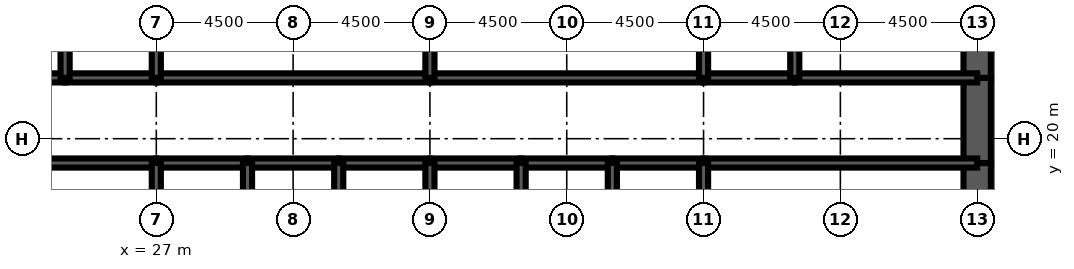
"""IFC4 building model, lengths in metres.
Left out: names, types, materials, properties, quantities, classifications, styles, units other than length and angle.
Written with IfcOpenShell. Run it as: python <this file> out.ifc"""

import sys

from ifc_helpers import new_model, si_unit, direction, frame, frame_2d, origin, place, context, subcontext, project, spatial, rectangle, extrude, element, fill, save


model = new_model("IFC4")
c1 = context("Model", 3, precision=1e-05, world=origin(), true_north=direction((0.0, 1.0)))
c2 = subcontext(c1, "Body", "Model", "MODEL_VIEW")
j1 = project(units=[si_unit("LENGTHUNIT", "METRE"), si_unit("PLANEANGLEUNIT", "RADIAN")], contexts=[c1])
p1 = place(None, origin())
s1 = spatial("IfcSite", under=j1, at=p1, CompositionType="ELEMENT")
p2 = place(p1, origin())
s2 = spatial("IfcBuilding", under=s1, at=p2, CompositionType="ELEMENT")
p3 = place(p2, frame((0.0, 0.0, 90.5)))
s3 = spatial("IfcBuildingStorey", under=s2, at=p3, CompositionType="ELEMENT", Elevation=90.5)
p4 = place(p3, frame((54.0, 16.0, 0.0), z_axis=(0.0, 0.0, 1.0), x_axis=(0.0, 1.0, 0.0)))
e1 = element("IfcWall", 1, at=p4, inside=s3, PredefinedType="SHEAR", context=c2, shape_type="SweptSolid", body=[
    extrude(rectangle(XDim=3.2, YDim=0.9, at=frame_2d((1.6, 0.0))), origin(), (0.0, 0.0, 1.0), 4.5),
])
p5 = place(p3, frame((54.0, 19.2, 0.0), z_axis=(0.0, 0.0, 1.0), x_axis=(0.0, 1.0, 0.0)))
e2 = element("IfcWall", 2, at=p5, inside=s3, PredefinedType="SHEAR", context=c2, shape_type="SweptSolid", body=[
    extrude(rectangle(XDim=2.8, YDim=0.9, at=frame_2d((1.4, 0.0))), origin(), (0.0, 0.0, 1.0), 4.5),
])
p6 = place(p5, frame((0.4, 0.0, 0.0)))
e3 = element("IfcOpeningElement", 3, at=p6, cuts=e2, PredefinedType="OPENING", context=c2, shape_type="SweptSolid", body=[
    extrude(rectangle(XDim=1.8, YDim=2.1, at=frame_2d((0.9, 1.05))), frame((0.0, 0.46, 0.0), z_axis=(0.0, -1.0, 0.0), x_axis=(1.0, 0.0, 0.0)), (0.0, 0.0, 1.0), 0.92),
])
p7 = place(p3, frame((54.0, 22.0, 0.0), z_axis=(0.0, 0.0, 1.0), x_axis=(0.0, 1.0, 0.0)))
e4 = element("IfcWall", 4, at=p7, inside=s3, PredefinedType="SHEAR", context=c2, shape_type="SweptSolid", body=[
    extrude(rectangle(XDim=4.0, YDim=0.9, at=frame_2d((2.0, 0.0))), origin(), (0.0, 0.0, 1.0), 4.5),
])
p8 = place(p3, frame((18.0, 19.2, 0.0), z_axis=(0.0, 0.0, 1.0), x_axis=(1.0, 0.0, 0.0)))
e5 = element("IfcWall", 5, at=p8, inside=s3, PredefinedType="SOLIDWALL", context=c2, shape_type="SweptSolid", body=[
    extrude(rectangle(XDim=9.0, YDim=0.3, at=frame_2d((4.5, 0.0))), origin(), (0.0, 0.0, 1.0), 4.5),
])
p9 = place(p8, frame((0.65, 0.0, 0.0)))
e6 = element("IfcOpeningElement", 6, at=p9, cuts=e5, PredefinedType="OPENING", context=c2, shape_type="SweptSolid", body=[
    extrude(rectangle(XDim=1.0, YDim=2.1, at=frame_2d((0.5, 1.05))), frame((0.0, 0.16, 0.0), z_axis=(0.0, -1.0, 0.0), x_axis=(1.0, 0.0, 0.0)), (0.0, 0.0, 1.0), 0.32),
])
p10 = place(p3, frame((27.0, 19.2, 0.0), z_axis=(0.0, 0.0, 1.0), x_axis=(1.0, 0.0, 0.0)))
e7 = element("IfcWall", 7, at=p10, inside=s3, PredefinedType="SOLIDWALL", context=c2, shape_type="SweptSolid", body=[
    extrude(rectangle(XDim=3.0, YDim=0.3, at=frame_2d((1.5, 0.0))), origin(), (0.0, 0.0, 1.0), 4.5),
])
p11 = place(p10, frame((0.95, 0.0, 0.0)))
e8 = element("IfcOpeningElement", 8, at=p11, cuts=e7, PredefinedType="OPENING", context=c2, shape_type="SweptSolid", body=[
    extrude(rectangle(XDim=1.1, YDim=2.2, at=frame_2d((0.55, 1.1))), frame((0.0, 0.16, 0.0), z_axis=(0.0, -1.0, 0.0), x_axis=(1.0, 0.0, 0.0)), (0.0, 0.0, 1.0), 0.32),
])
p12 = place(p3, frame((30.0, 19.2, 0.0), z_axis=(0.0, 0.0, 1.0), x_axis=(1.0, 0.0, 0.0)))
e9 = element("IfcWall", 9, at=p12, inside=s3, PredefinedType="SOLIDWALL", context=c2, shape_type="SweptSolid", body=[
    extrude(rectangle(XDim=3.0, YDim=0.3, at=frame_2d((1.5, 0.0))), origin(), (0.0, 0.0, 1.0), 4.5),
])
p13 = place(p12, frame((0.95, 0.0, 0.0)))
e10 = element("IfcOpeningElement", 10, at=p13, cuts=e9, PredefinedType="OPENING", context=c2, shape_type="SweptSolid", body=[
    extrude(rectangle(XDim=1.1, YDim=2.2, at=frame_2d((0.55, 1.1))), frame((0.0, 0.16, 0.0), z_axis=(0.0, -1.0, 0.0), x_axis=(1.0, 0.0, 0.0)), (0.0, 0.0, 1.0), 0.32),
])
p14 = place(p3, frame((33.0, 19.2, 0.0), z_axis=(0.0, 0.0, 1.0), x_axis=(1.0, 0.0, 0.0)))
e11 = element("IfcWall", 11, at=p14, inside=s3, PredefinedType="SOLIDWALL", context=c2, shape_type="SweptSolid", body=[
    extrude(rectangle(XDim=3.0, YDim=0.3, at=frame_2d((1.5, 0.0))), origin(), (0.0, 0.0, 1.0), 4.5),
])
p15 = place(p14, frame((0.95, 0.0, 0.0)))
e12 = element("IfcOpeningElement", 12, at=p15, cuts=e11, PredefinedType="OPENING", context=c2, shape_type="SweptSolid", body=[
    extrude(rectangle(XDim=1.1, YDim=2.2, at=frame_2d((0.55, 1.1))), frame((0.0, 0.16, 0.0), z_axis=(0.0, -1.0, 0.0), x_axis=(1.0, 0.0, 0.0)), (0.0, 0.0, 1.0), 0.32),
])
p16 = place(p3, frame((36.0, 19.2, 0.0), z_axis=(0.0, 0.0, 1.0), x_axis=(1.0, 0.0, 0.0)))
e13 = element("IfcWall", 13, at=p16, inside=s3, PredefinedType="SOLIDWALL", context=c2, shape_type="SweptSolid", body=[
    extrude(rectangle(XDim=3.0, YDim=0.3, at=frame_2d((1.5, 0.0))), origin(), (0.0, 0.0, 1.0), 4.5),
])
p17 = place(p16, frame((0.95, 0.0, 0.0)))
e14 = element("IfcOpeningElement", 14, at=p17, cuts=e13, PredefinedType="OPENING", context=c2, shape_type="SweptSolid", body=[
    extrude(rectangle(XDim=1.1, YDim=2.2, at=frame_2d((0.55, 1.1))), frame((0.0, 0.16, 0.0), z_axis=(0.0, -1.0, 0.0), x_axis=(1.0, 0.0, 0.0)), (0.0, 0.0, 1.0), 0.32),
])
for number, where, z_axis, x_axis in (
    (15, (39.0, 19.2, 0.0), (0.0, 0.0, 1.0), (1.0, 0.0, 0.0)),
    (16, (42.0, 19.2, 0.0), (0.0, 0.0, 1.0), (1.0, 0.0, 0.0)),
):
    element("IfcWall", number, at=place(p3, frame(where, z_axis=z_axis, x_axis=x_axis)), inside=s3, PredefinedType="SOLIDWALL", context=c2, shape_type="SweptSolid", body=[
        extrude(rectangle(XDim=3.0, YDim=0.3, at=frame_2d((1.5, 0.0))), origin(), (0.0, 0.0, 1.0), 4.5),
    ])
p18 = place(p3, frame((45.0, 19.2, 0.0), z_axis=(0.0, 0.0, 1.0), x_axis=(1.0, 0.0, 0.0)))
e17 = element("IfcWall", 17, at=p18, inside=s3, PredefinedType="SOLIDWALL", context=c2, shape_type="SweptSolid", body=[
    extrude(rectangle(XDim=9.0, YDim=0.3, at=frame_2d((4.5, 0.0))), origin(), (0.0, 0.0, 1.0), 4.5),
])
p19 = place(p18, frame((7.35, 0.0, 0.0)))
e18 = element("IfcOpeningElement", 18, at=p19, cuts=e17, PredefinedType="OPENING", context=c2, shape_type="SweptSolid", body=[
    extrude(rectangle(XDim=1.0, YDim=2.1, at=frame_2d((0.5, 1.05))), frame((0.0, 0.16, 0.0), z_axis=(0.0, -1.0, 0.0), x_axis=(1.0, 0.0, 0.0)), (0.0, 0.0, 1.0), 0.32),
])
p20 = place(p3, frame((18.0, 22.0, 0.0), z_axis=(0.0, 0.0, 1.0), x_axis=(1.0, 0.0, 0.0)))
e19 = element("IfcWall", 19, at=p20, inside=s3, PredefinedType="SOLIDWALL", context=c2, shape_type="SweptSolid", body=[
    extrude(rectangle(XDim=6.0, YDim=0.3, at=frame_2d((3.0, 0.0))), origin(), (0.0, 0.0, 1.0), 4.5),
])
p21 = place(p20, frame((4.4, 0.0, 0.0)))
e20 = element("IfcOpeningElement", 20, at=p21, cuts=e19, PredefinedType="OPENING", context=c2, shape_type="SweptSolid", body=[
    extrude(rectangle(XDim=1.0, YDim=2.1, at=frame_2d((0.5, 1.05))), frame((0.0, 0.16, 0.0), z_axis=(0.0, -1.0, 0.0), x_axis=(1.0, 0.0, 0.0)), (0.0, 0.0, 1.0), 0.32),
])
p22 = place(p20, frame((1.0, 0.0, 0.0)))
e21 = element("IfcOpeningElement", 21, at=p22, cuts=e19, PredefinedType="OPENING", context=c2, shape_type="SweptSolid", body=[
    extrude(rectangle(XDim=1.0, YDim=2.1, at=frame_2d((0.5, 1.05))), frame((0.0, 0.16, 0.0), z_axis=(0.0, -1.0, 0.0), x_axis=(1.0, 0.0, 0.0)), (0.0, 0.0, 1.0), 0.32),
])
p23 = place(p3, frame((24.0, 22.0, 0.0), z_axis=(0.0, 0.0, 1.0), x_axis=(1.0, 0.0, 0.0)))
e22 = element("IfcWall", 22, at=p23, inside=s3, PredefinedType="SOLIDWALL", context=c2, shape_type="SweptSolid", body=[
    extrude(rectangle(XDim=3.0, YDim=0.3, at=frame_2d((1.5, 0.0))), origin(), (0.0, 0.0, 1.0), 4.5),
])
p24 = place(p23, frame((1.0, 0.0, 0.0)))
e23 = element("IfcOpeningElement", 23, at=p24, cuts=e22, PredefinedType="OPENING", context=c2, shape_type="SweptSolid", body=[
    extrude(rectangle(XDim=1.0, YDim=2.1, at=frame_2d((0.5, 1.05))), frame((0.0, 0.16, 0.0), z_axis=(0.0, -1.0, 0.0), x_axis=(1.0, 0.0, 0.0)), (0.0, 0.0, 1.0), 0.32),
])
p25 = place(p3, frame((27.0, 22.0, 0.0), z_axis=(0.0, 0.0, 1.0), x_axis=(1.0, 0.0, 0.0)))
e24 = element("IfcWall", 24, at=p25, inside=s3, PredefinedType="SOLIDWALL", context=c2, shape_type="SweptSolid", body=[
    extrude(rectangle(XDim=9.0, YDim=0.3, at=frame_2d((4.5, 0.0))), origin(), (0.0, 0.0, 1.0), 4.5),
])
p26 = place(p25, frame((4.0, 0.0, 0.0)))
e25 = element("IfcOpeningElement", 25, at=p26, cuts=e24, PredefinedType="OPENING", context=c2, shape_type="SweptSolid", body=[
    extrude(rectangle(XDim=1.0, YDim=2.1, at=frame_2d((0.5, 1.05))), frame((0.0, 0.16, 0.0), z_axis=(0.0, -1.0, 0.0), x_axis=(1.0, 0.0, 0.0)), (0.0, 0.0, 1.0), 0.32),
])
p27 = place(p3, frame((36.0, 22.0, 0.0), z_axis=(0.0, 0.0, 1.0), x_axis=(1.0, 0.0, 0.0)))
e26 = element("IfcWall", 26, at=p27, inside=s3, PredefinedType="SOLIDWALL", context=c2, shape_type="SweptSolid", body=[
    extrude(rectangle(XDim=9.0, YDim=0.3, at=frame_2d((4.5, 0.0))), origin(), (0.0, 0.0, 1.0), 4.5),
])
p28 = place(p27, frame((4.0, 0.0, 0.0)))
e27 = element("IfcOpeningElement", 27, at=p28, cuts=e26, PredefinedType="OPENING", context=c2, shape_type="SweptSolid", body=[
    extrude(rectangle(XDim=1.0, YDim=2.1, at=frame_2d((0.5, 1.05))), frame((0.0, 0.16, 0.0), z_axis=(0.0, -1.0, 0.0), x_axis=(1.0, 0.0, 0.0)), (0.0, 0.0, 1.0), 0.32),
])
p29 = place(p3, frame((45.0, 22.0, 0.0), z_axis=(0.0, 0.0, 1.0), x_axis=(1.0, 0.0, 0.0)))
e28 = element("IfcWall", 28, at=p29, inside=s3, PredefinedType="SOLIDWALL", context=c2, shape_type="SweptSolid", body=[
    extrude(rectangle(XDim=3.0, YDim=0.3, at=frame_2d((1.5, 0.0))), origin(), (0.0, 0.0, 1.0), 4.5),
])
p30 = place(p29, frame((1.0, 0.0, 0.0)))
e29 = element("IfcOpeningElement", 29, at=p30, cuts=e28, PredefinedType="OPENING", context=c2, shape_type="SweptSolid", body=[
    extrude(rectangle(XDim=1.0, YDim=2.1, at=frame_2d((0.5, 1.05))), frame((0.0, 0.16, 0.0), z_axis=(0.0, -1.0, 0.0), x_axis=(1.0, 0.0, 0.0)), (0.0, 0.0, 1.0), 0.32),
])
p31 = place(p3, frame((48.0, 22.0, 0.0), z_axis=(0.0, 0.0, 1.0), x_axis=(1.0, 0.0, 0.0)))
e30 = element("IfcWall", 30, at=p31, inside=s3, PredefinedType="SOLIDWALL", context=c2, shape_type="SweptSolid", body=[
    extrude(rectangle(XDim=6.0, YDim=0.3, at=frame_2d((3.0, 0.0))), origin(), (0.0, 0.0, 1.0), 4.5),
])
p32 = place(p31, frame((2.0, 0.0, 0.0)))
e31 = element("IfcOpeningElement", 31, at=p32, cuts=e30, PredefinedType="OPENING", context=c2, shape_type="SweptSolid", body=[
    extrude(rectangle(XDim=1.0, YDim=2.1, at=frame_2d((0.5, 1.05))), frame((0.0, 0.16, 0.0), z_axis=(0.0, -1.0, 0.0), x_axis=(1.0, 0.0, 0.0)), (0.0, 0.0, 1.0), 0.32),
])
p33 = place(p31, frame((4.0, 0.0, 0.0)))
e32 = element("IfcOpeningElement", 32, at=p33, cuts=e30, PredefinedType="OPENING", context=c2, shape_type="SweptSolid", body=[
    extrude(rectangle(XDim=1.0, YDim=2.1, at=frame_2d((0.5, 1.05))), frame((0.0, 0.16, 0.0), z_axis=(0.0, -1.0, 0.0), x_axis=(1.0, 0.0, 0.0)), (0.0, 0.0, 1.0), 0.32),
])
for number, where, z_axis, x_axis in (
    (33, (27.0, 16.0, 0.0), (0.0, 0.0, 1.0), (0.0, 1.0, 0.0)),
    (34, (30.0, 16.0, 0.0), (0.0, 0.0, 1.0), (0.0, 1.0, 0.0)),
    (35, (33.0, 16.0, 0.0), (0.0, 0.0, 1.0), (0.0, 1.0, 0.0)),
    (36, (36.0, 16.0, 0.0), (0.0, 0.0, 1.0), (0.0, 1.0, 0.0)),
    (37, (39.0, 16.0, 0.0), (0.0, 0.0, 1.0), (0.0, 1.0, 0.0)),
    (38, (42.0, 16.0, 0.0), (0.0, 0.0, 1.0), (0.0, 1.0, 0.0)),
    (39, (45.0, 16.0, 0.0), (0.0, 0.0, 1.0), (0.0, 1.0, 0.0)),
):
    element("IfcWall", number, at=place(p3, frame(where, z_axis=z_axis, x_axis=x_axis)), inside=s3, PredefinedType="SOLIDWALL", context=c2, shape_type="SweptSolid", body=[
        extrude(rectangle(XDim=3.2, YDim=0.3, at=frame_2d((1.6, 0.0))), origin(), (0.0, 0.0, 1.0), 4.5),
    ])
for number, where, z_axis, x_axis in (
    (40, (24.0, 22.0, 0.0), (0.0, 0.0, 1.0), (0.0, 1.0, 0.0)),
    (41, (27.0, 22.0, 0.0), (0.0, 0.0, 1.0), (0.0, 1.0, 0.0)),
    (42, (36.0, 22.0, 0.0), (0.0, 0.0, 1.0), (0.0, 1.0, 0.0)),
    (43, (45.0, 22.0, 0.0), (0.0, 0.0, 1.0), (0.0, 1.0, 0.0)),
    (44, (48.0, 22.0, 0.0), (0.0, 0.0, 1.0), (0.0, 1.0, 0.0)),
):
    element("IfcWall", number, at=place(p3, frame(where, z_axis=z_axis, x_axis=x_axis)), inside=s3, PredefinedType="SOLIDWALL", context=c2, shape_type="SweptSolid", body=[
        extrude(rectangle(XDim=4.0, YDim=0.3, at=frame_2d((2.0, 0.0))), origin(), (0.0, 0.0, 1.0), 4.5),
    ])
p34 = place(p3, frame((38.5, 22.15, 0.0), z_axis=(0.0, 0.0, 1.0), x_axis=(0.0, 1.0, 0.0)))
e45 = element("IfcWall", 45, at=p34, inside=s3, PredefinedType="PARTITIONING", context=c2, shape_type="SweptSolid", body=[
    extrude(rectangle(XDim=3.7, YDim=0.15, at=frame_2d((1.85, 0.0))), origin(), (0.0, 0.0, 1.0), 3.0),
])
p35 = place(p34, frame((2.2, 0.0, 0.0)))
e46 = element("IfcOpeningElement", 46, at=p35, cuts=e45, PredefinedType="OPENING", context=c2, shape_type="SweptSolid", body=[
    extrude(rectangle(XDim=1.0, YDim=2.1, at=frame_2d((0.5, 1.05))), frame((0.0, 0.085, 0.0), z_axis=(0.0, -1.0, 0.0), x_axis=(1.0, 0.0, 0.0)), (0.0, 0.0, 1.0), 0.17),
])
p36 = place(p3, frame((51.375, 22.15, 0.0), z_axis=(0.0, 0.0, 1.0), x_axis=(0.0, 1.0, 0.0)))
e47 = element("IfcWall", 47, at=p36, inside=s3, PredefinedType="PARTITIONING", context=c2, shape_type="SweptSolid", body=[
    extrude(rectangle(XDim=3.7, YDim=0.15, at=frame_2d((1.85, 0.0))), origin(), (0.0, 0.0, 1.0), 3.0),
])
p37 = place(p3, frame((24.5, 19.35, 0.0), z_axis=(0.0, 0.0, 1.0), x_axis=(0.0, 1.0, 0.0)))
e48 = element("IfcWall", 48, at=p37, inside=s3, PredefinedType="PARTITIONING", context=c2, shape_type="SweptSolid", body=[
    extrude(rectangle(XDim=2.5, YDim=0.15, at=frame_2d((1.25, 0.0))), origin(), (0.0, 0.0, 1.0), 3.0),
])
p38 = place(p37, frame((1.15, 0.0, 0.0)))
e49 = element("IfcOpeningElement", 49, at=p38, cuts=e48, PredefinedType="OPENING", context=c2, shape_type="SweptSolid", body=[
    extrude(rectangle(XDim=1.0, YDim=2.1, at=frame_2d((0.5, 1.05))), frame((0.0, 0.085, 0.0), z_axis=(0.0, -1.0, 0.0), x_axis=(1.0, 0.0, 0.0)), (0.0, 0.0, 1.0), 0.17),
])
p39 = place(p38, origin())
e50 = element("IfcDoor", 50, at=p39, inside=s3, OperationType="SINGLE_SWING_RIGHT", PredefinedType="DOOR", context=c2, shape_type="SweptSolid", body=[
    extrude(rectangle(XDim=1.0, YDim=2.1, at=frame_2d((0.5, 1.05))), frame((0.0, 0.025, 0.0), z_axis=(0.0, -1.0, 0.0), x_axis=(1.0, 0.0, 0.0)), (0.0, 0.0, 1.0), 0.05),
])
fill(e49, e50)
p40 = place(p11, origin())
e51 = element("IfcDoor", 51, at=p40, inside=s3, OperationType="DOUBLE_DOOR_SLIDING", PredefinedType="USERDEFINED", context=c2, shape_type="SweptSolid", body=[
    extrude(rectangle(XDim=1.1, YDim=2.2, at=frame_2d((0.55, 1.1))), frame((0.0, 0.025, 0.0), z_axis=(0.0, -1.0, 0.0), x_axis=(1.0, 0.0, 0.0)), (0.0, 0.0, 1.0), 0.05),
])
fill(e8, e51)
p41 = place(p13, origin())
e52 = element("IfcDoor", 52, at=p41, inside=s3, OperationType="DOUBLE_DOOR_SLIDING", PredefinedType="USERDEFINED", context=c2, shape_type="SweptSolid", body=[
    extrude(rectangle(XDim=1.1, YDim=2.2, at=frame_2d((0.55, 1.1))), frame((0.0, 0.025, 0.0), z_axis=(0.0, -1.0, 0.0), x_axis=(1.0, 0.0, 0.0)), (0.0, 0.0, 1.0), 0.05),
])
fill(e10, e52)
p42 = place(p15, origin())
e53 = element("IfcDoor", 53, at=p42, inside=s3, OperationType="DOUBLE_DOOR_SLIDING", PredefinedType="USERDEFINED", context=c2, shape_type="SweptSolid", body=[
    extrude(rectangle(XDim=1.1, YDim=2.2, at=frame_2d((0.55, 1.1))), frame((0.0, 0.025, 0.0), z_axis=(0.0, -1.0, 0.0), x_axis=(1.0, 0.0, 0.0)), (0.0, 0.0, 1.0), 0.05),
])
fill(e12, e53)
p43 = place(p17, origin())
e54 = element("IfcDoor", 54, at=p43, inside=s3, OperationType="DOUBLE_DOOR_SLIDING", PredefinedType="USERDEFINED", context=c2, shape_type="SweptSolid", body=[
    extrude(rectangle(XDim=1.1, YDim=2.2, at=frame_2d((0.55, 1.1))), frame((0.0, 0.025, 0.0), z_axis=(0.0, -1.0, 0.0), x_axis=(1.0, 0.0, 0.0)), (0.0, 0.0, 1.0), 0.05),
])
fill(e14, e54)
p44 = place(p19, origin())
e55 = element("IfcDoor", 55, at=p44, inside=s3, OperationType="SINGLE_SWING_RIGHT", PredefinedType="DOOR", context=c2, shape_type="SweptSolid", body=[
    extrude(rectangle(XDim=1.0, YDim=2.1, at=frame_2d((0.5, 1.05))), frame((0.0, 0.025, 0.0), z_axis=(0.0, -1.0, 0.0), x_axis=(1.0, 0.0, 0.0)), (0.0, 0.0, 1.0), 0.05),
])
fill(e18, e55)
p45 = place(p6, origin())
e56 = element("IfcDoor", 56, at=p45, inside=s3, OperationType="SINGLE_SWING_LEFT", PredefinedType="DOOR", context=c2, shape_type="SweptSolid", body=[
    extrude(rectangle(XDim=1.8, YDim=2.1, at=frame_2d((0.9, 1.05))), frame((0.0, 0.45, 0.0), z_axis=(0.0, -1.0, 0.0), x_axis=(1.0, 0.0, 0.0)), (0.0, 0.0, 1.0), 0.899),
])
fill(e3, e56)
p46 = place(p24, origin())
e57 = element("IfcDoor", 57, at=p46, inside=s3, OperationType="SINGLE_SWING_LEFT", PredefinedType="DOOR", context=c2, shape_type="SweptSolid", body=[
    extrude(rectangle(XDim=1.0, YDim=2.1, at=frame_2d((0.5, 1.05))), frame((0.0, 0.025, 0.0), z_axis=(0.0, -1.0, 0.0), x_axis=(1.0, 0.0, 0.0)), (0.0, 0.0, 1.0), 0.05),
])
fill(e23, e57)
p47 = place(p26, origin())
e58 = element("IfcDoor", 58, at=p47, inside=s3, OperationType="SINGLE_SWING_LEFT", PredefinedType="DOOR", context=c2, shape_type="SweptSolid", body=[
    extrude(rectangle(XDim=1.0, YDim=2.1, at=frame_2d((0.5, 1.05))), frame((0.0, 0.025, 0.0), z_axis=(0.0, -1.0, 0.0), x_axis=(1.0, 0.0, 0.0)), (0.0, 0.0, 1.0), 0.05),
])
fill(e25, e58)
p48 = place(p28, origin())
e59 = element("IfcDoor", 59, at=p48, inside=s3, OperationType="SINGLE_SWING_LEFT", PredefinedType="DOOR", context=c2, shape_type="SweptSolid", body=[
    extrude(rectangle(XDim=1.0, YDim=2.1, at=frame_2d((0.5, 1.05))), frame((0.0, 0.025, 0.0), z_axis=(0.0, -1.0, 0.0), x_axis=(1.0, 0.0, 0.0)), (0.0, 0.0, 1.0), 0.05),
])
fill(e27, e59)
p49 = place(p30, origin())
e60 = element("IfcDoor", 60, at=p49, inside=s3, OperationType="SINGLE_SWING_LEFT", PredefinedType="DOOR", context=c2, shape_type="SweptSolid", body=[
    extrude(rectangle(XDim=1.0, YDim=2.1, at=frame_2d((0.5, 1.05))), frame((0.0, 0.025, 0.0), z_axis=(0.0, -1.0, 0.0), x_axis=(1.0, 0.0, 0.0)), (0.0, 0.0, 1.0), 0.05),
])
fill(e29, e60)
p50 = place(p32, origin())
e61 = element("IfcDoor", 61, at=p50, inside=s3, OperationType="SINGLE_SWING_LEFT", PredefinedType="DOOR", context=c2, shape_type="SweptSolid", body=[
    extrude(rectangle(XDim=1.0, YDim=2.1, at=frame_2d((0.5, 1.05))), frame((0.0, 0.025, 0.0), z_axis=(0.0, -1.0, 0.0), x_axis=(1.0, 0.0, 0.0)), (0.0, 0.0, 1.0), 0.05),
])
fill(e31, e61)
p51 = place(p33, origin())
e62 = element("IfcDoor", 62, at=p51, inside=s3, OperationType="SINGLE_SWING_RIGHT", PredefinedType="DOOR", context=c2, shape_type="SweptSolid", body=[
    extrude(rectangle(XDim=1.0, YDim=2.1, at=frame_2d((0.5, 1.05))), frame((0.0, 0.025, 0.0), z_axis=(0.0, -1.0, 0.0), x_axis=(1.0, 0.0, 0.0)), (0.0, 0.0, 1.0), 0.05),
])
fill(e32, e62)
save(model, sys.argv[1])
